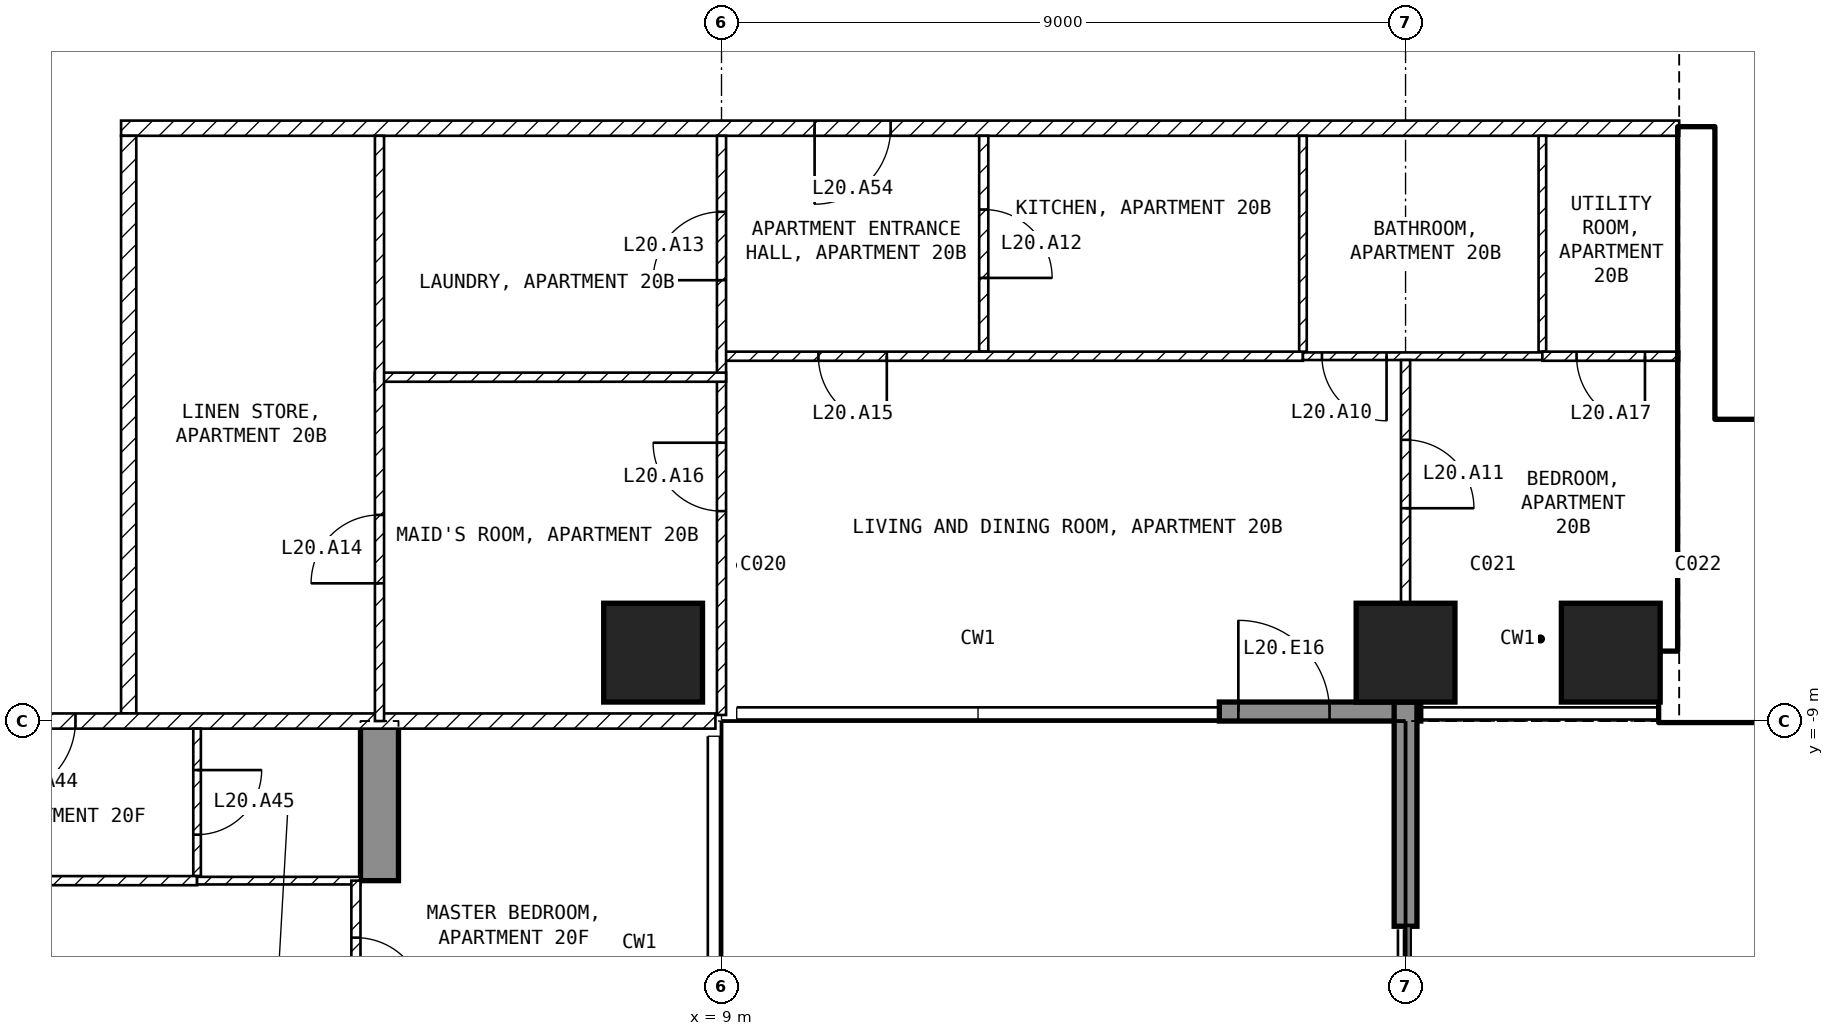
"""IFC4 building model, lengths in metres.
Left out: names, types, materials, properties, quantities, classifications, styles, units other than length and angle.
Written with IfcOpenShell. Run it as: python <this file> out.ifc"""

import sys

from ifc_helpers import new_model, si_unit, direction, frame, frame_2d, origin, origin_2d, place, context, subcontext, project, spatial, polyline, rectangle, outline, extrude, element, fill, save


model = new_model("IFC4")
c1 = context("Model", 3, precision=1e-05, world=origin(), true_north=direction((0.0, 1.0)))
c2 = subcontext(c1, "Body", "Model", "MODEL_VIEW")
j1 = project(units=[si_unit("LENGTHUNIT", "METRE"), si_unit("PLANEANGLEUNIT", "RADIAN")], contexts=[c1])
p1 = place(None, origin())
s1 = spatial("IfcSite", under=j1, at=p1, CompositionType="ELEMENT")
p2 = place(p1, origin())
s2 = spatial("IfcBuilding", under=s1, at=p2, CompositionType="ELEMENT")
p3 = place(p2, frame((0.0, 0.0, 89.0)))
s3 = spatial("IfcBuildingStorey", under=s2, at=p3, CompositionType="ELEMENT", Elevation=89.0)
for number, where, z_axis, x_axis in (
    (1, (8.1, -8.1, -0.25), (0.0, 0.0, 1.0), (1.0, 0.0, 0.0)),
    (2, (18.0, -8.1, -0.25), (0.0, 0.0, 1.0), (1.0, 0.0, 0.0)),
    (3, (20.7, -8.1, -0.25), (0.0, 0.0, 1.0), (1.0, 0.0, 0.0)),
):
    element("IfcColumn", number, at=place(p3, frame(where, z_axis=z_axis, x_axis=x_axis)), inside=s3, PredefinedType="COLUMN", context=c2, shape_type="SweptSolid", body=[
        extrude(rectangle(XDim=1.3, YDim=1.3, at=origin_2d()), origin(), (0.0, 0.0, 1.0), 3.45),
    ])
p4 = place(p3, frame((4.25, -25.45, -0.25), z_axis=(1.0, 0.0, 0.0), x_axis=(0.0, 1.0, 0.0)))
e4 = element("IfcWall", 4, at=p4, inside=s3, PredefinedType="SHEAR", context=c2, shape_type="SweptSolid", body=[
    extrude(outline(polyline([(0.0, 0.0), (4.15, 0.0), (4.15, 2.65), (6.55, 2.65), (6.55, 0.0), (11.95, 0.0), (11.95, 2.65), (14.35, 2.65), (14.35, 0.0), (16.45, 0.0), (16.45, 3.45), (0.0, 3.45), (0.0, 0.0)])), origin(), (0.0, 0.0, 1.0), 0.5),
])
p5 = place(p3, frame((15.55, -8.875, 0.0), z_axis=(0.0, 0.0, 1.0), x_axis=(1.0, 0.0, 0.0)))
e5 = element("IfcWall", 5, at=p5, inside=s3, PredefinedType="SOLIDWALL", context=c2, shape_type="SweptSolid", body=[
    extrude(rectangle(XDim=2.65, YDim=0.25, at=frame_2d((1.325, 0.0))), origin(), (0.0, 0.0, 1.0), 3.2),
])
p6 = place(p5, frame((0.25, 0.0, 0.0)))
e6 = element("IfcOpeningElement", 6, at=p6, cuts=e5, PredefinedType="OPENING", context=c2, shape_type="SweptSolid", body=[
    extrude(rectangle(XDim=1.2, YDim=2.4, at=frame_2d((0.6, 1.2))), frame((0.0, 0.135, 0.0), z_axis=(0.0, -1.0, 0.0), x_axis=(1.0, 0.0, 0.0)), (0.0, 0.0, 1.0), 0.27),
])
p7 = place(p3, frame((18.0, -8.75, 0.0), z_axis=(0.0, 0.0, 1.0), x_axis=(0.0, -1.0, 0.0)))
e7 = element("IfcWall", 7, at=p7, inside=s3, PredefinedType="SOLIDWALL", context=c2, shape_type="SweptSolid", body=[
    extrude(rectangle(XDim=2.95, YDim=0.3, at=frame_2d((1.475, 0.0))), origin(), (0.0, 0.0, 1.0), 3.2),
])
p8 = place(p3, frame((21.35, -8.55, 0.0), z_axis=(0.0, 0.0, 1.0), x_axis=(1.0, 0.0, 0.0)))
e8 = element("IfcWall", 8, at=p8, inside=s3, PredefinedType="SHEAR", context=c2, shape_type="SweptSolid", body=[
    extrude(rectangle(XDim=11.05, YDim=0.9, at=frame_2d((5.525, 0.0))), origin(), (0.0, 0.0, 1.0), 3.2),
])
p9 = place(p3, frame((21.825, -8.1, 0.0), z_axis=(0.0, 0.0, 1.0), x_axis=(0.0, 1.0, 0.0)))
e9 = element("IfcWall", 9, at=p9, inside=s3, PredefinedType="SHEAR", context=c2, shape_type="SweptSolid", body=[
    extrude(rectangle(XDim=6.9, YDim=0.45, at=frame_2d((3.45, 0.0))), origin(), (0.0, 0.0, 1.0), 3.2),
])
p10 = place(p3, frame((22.05, -5.15, 0.0), z_axis=(0.0, 0.0, 1.0), x_axis=(1.0, 0.0, 0.0)))
e10 = element("IfcWall", 10, at=p10, inside=s3, PredefinedType="SOLIDWALL", context=c2, shape_type="SweptSolid", body=[
    extrude(rectangle(XDim=6.3, YDim=0.2, at=frame_2d((3.15, 0.0))), origin(), (0.0, 0.0, 1.0), 3.2),
])
p11 = place(p10, frame((0.2, 0.0, 0.0)))
e11 = element("IfcOpeningElement", 11, at=p11, cuts=e10, PredefinedType="OPENING", context=c2, shape_type="SweptSolid", body=[
    extrude(rectangle(XDim=1.0, YDim=2.1, at=frame_2d((0.5, 1.05))), frame((0.0, 0.11, 0.0), z_axis=(0.0, -1.0, 0.0), x_axis=(1.0, 0.0, 0.0)), (0.0, 0.0, 1.0), 0.22),
])
p12 = place(p3, frame((21.6, -1.2, 0.0), z_axis=(0.0, 0.0, 1.0), x_axis=(-1.0, 0.0, 0.0)))
e12 = element("IfcWall", 12, at=p12, inside=s3, PredefinedType="PARTITIONING", context=c2, shape_type="SweptSolid", body=[
    extrude(rectangle(XDim=20.5, YDim=0.2, at=frame_2d((10.25, 0.0))), origin(), (0.0, 0.0, 1.0), 3.2),
])
p13 = place(p12, frame((10.375, 0.0, 0.0)))
e13 = element("IfcOpeningElement", 13, at=p13, cuts=e12, PredefinedType="OPENING", context=c2, shape_type="SweptSolid", body=[
    extrude(rectangle(XDim=1.0, YDim=2.1, at=frame_2d((0.5, 1.05))), frame((0.0, 0.11, 0.0), z_axis=(0.0, -1.0, 0.0), x_axis=(1.0, 0.0, 0.0)), (0.0, 0.0, 1.0), 0.22),
])
p14 = place(p3, frame((1.2, -1.3, 0.0), z_axis=(0.0, 0.0, 1.0), x_axis=(0.0, -1.0, 0.0)))
e14 = element("IfcWall", 14, at=p14, inside=s3, PredefinedType="PARTITIONING", context=c2, shape_type="SweptSolid", body=[
    extrude(rectangle(XDim=7.6, YDim=0.2, at=frame_2d((3.8, 0.0))), origin(), (0.0, 0.0, 1.0), 3.2),
])
p15 = place(p3, frame((8.92, -9.0, 0.0), z_axis=(0.0, 0.0, 1.0), x_axis=(-1.0, 0.0, 0.0)))
e15 = element("IfcWall", 15, at=p15, inside=s3, PredefinedType="PARTITIONING", context=c2, shape_type="SweptSolid", body=[
    extrude(rectangle(XDim=17.84, YDim=0.2, at=frame_2d((8.92, 0.0))), origin(), (0.0, 0.0, 1.0), 3.2),
])
p16 = place(p15, frame((8.42, 0.0, 0.0)))
e16 = element("IfcOpeningElement", 16, at=p16, cuts=e15, PredefinedType="OPENING", context=c2, shape_type="SweptSolid", body=[
    extrude(rectangle(XDim=1.0, YDim=2.1, at=frame_2d((0.5, 1.05))), frame((0.0, 0.11, 0.0), z_axis=(0.0, -1.0, 0.0), x_axis=(1.0, 0.0, 0.0)), (0.0, 0.0, 1.0), 0.22),
])
p17 = place(p3, frame((12.45, -1.3, 0.0), z_axis=(0.0, 0.0, 1.0), x_axis=(0.0, -1.0, 0.0)))
e17 = element("IfcWall", 17, at=p17, inside=s3, PredefinedType="PARTITIONING", context=c2, shape_type="SweptSolid", body=[
    extrude(rectangle(XDim=2.84, YDim=0.12, at=frame_2d((1.42, 0.0))), origin(), (0.0, 0.0, 1.0), 3.2),
])
p18 = place(p17, frame((0.97, 0.0, 0.0)))
e18 = element("IfcOpeningElement", 18, at=p18, cuts=e17, PredefinedType="OPENING", context=c2, shape_type="SweptSolid", body=[
    extrude(rectangle(XDim=0.9, YDim=2.1, at=frame_2d((0.45, 1.05))), frame((0.0, 0.07, 0.0), z_axis=(0.0, -1.0, 0.0), x_axis=(1.0, 0.0, 0.0)), (0.0, 0.0, 1.0), 0.14),
])
p19 = place(p3, frame((16.65, -4.2, 0.0), z_axis=(0.0, 0.0, 1.0), x_axis=(-1.0, 0.0, 0.0)))
e19 = element("IfcWall", 19, at=p19, inside=s3, PredefinedType="PARTITIONING", context=c2, shape_type="SweptSolid", body=[
    extrude(rectangle(XDim=7.71, YDim=0.12, at=frame_2d((3.855, 0.0))), origin(), (0.0, 0.0, 1.0), 3.2),
])
p20 = place(p19, frame((5.475, 0.0, 0.0)))
e20 = element("IfcOpeningElement", 20, at=p20, cuts=e19, PredefinedType="OPENING", context=c2, shape_type="SweptSolid", body=[
    extrude(rectangle(XDim=0.9, YDim=2.1, at=frame_2d((0.45, 1.05))), frame((0.0, 0.07, 0.0), z_axis=(0.0, -1.0, 0.0), x_axis=(1.0, 0.0, 0.0)), (0.0, 0.0, 1.0), 0.14),
])
p21 = place(p3, frame((9.0, -8.92, 0.0), z_axis=(0.0, 0.0, 1.0), x_axis=(0.0, 1.0, 0.0)))
e21 = element("IfcWall", 21, at=p21, inside=s3, PredefinedType="PARTITIONING", context=c2, shape_type="SweptSolid", body=[
    extrude(rectangle(XDim=7.62, YDim=0.12, at=frame_2d((3.81, 0.0))), origin(), (0.0, 0.0, 1.0), 3.2),
])
p22 = place(p21, frame((5.72, 0.0, 0.0)))
e22 = element("IfcOpeningElement", 22, at=p22, cuts=e21, PredefinedType="OPENING", context=c2, shape_type="SweptSolid", body=[
    extrude(rectangle(XDim=0.9, YDim=2.1, at=frame_2d((0.45, 1.05))), frame((0.0, 0.07, 0.0), z_axis=(0.0, -1.0, 0.0), x_axis=(1.0, 0.0, 0.0)), (0.0, 0.0, 1.0), 0.14),
])
p23 = place(p21, frame((2.682, 0.0, 0.0)))
e23 = element("IfcOpeningElement", 23, at=p23, cuts=e21, PredefinedType="OPENING", context=c2, shape_type="SweptSolid", body=[
    extrude(rectangle(XDim=0.9, YDim=2.1, at=frame_2d((0.45, 1.05))), frame((0.0, 0.07, 0.0), z_axis=(0.0, -1.0, 0.0), x_axis=(1.0, 0.0, 0.0)), (0.0, 0.0, 1.0), 0.14),
])
for number, where, z_axis, x_axis in (
    (24, (16.65, -1.3, 0.0), (0.0, 0.0, 1.0), (0.0, -1.0, 0.0)),
    (25, (19.8, -1.3, 0.0), (0.0, 0.0, 1.0), (0.0, -1.0, 0.0)),
):
    element("IfcWall", number, at=place(p3, frame(where, z_axis=z_axis, x_axis=x_axis)), inside=s3, PredefinedType="PARTITIONING", context=c2, shape_type="SweptSolid", body=[
        extrude(rectangle(XDim=2.84, YDim=0.1, at=frame_2d((1.42, 0.0))), origin(), (0.0, 0.0, 1.0), 3.2),
    ])
p24 = place(p3, frame((19.8, -4.2, 0.0), z_axis=(0.0, 0.0, 1.0), x_axis=(-1.0, 0.0, 0.0)))
e26 = element("IfcWall", 26, at=p24, inside=s3, PredefinedType="PARTITIONING", context=c2, shape_type="SweptSolid", body=[
    extrude(rectangle(XDim=3.15, YDim=0.1, at=frame_2d((1.575, 0.0))), origin(), (0.0, 0.0, 1.0), 3.2),
])
p25 = place(p24, frame((2.05, 0.0, 0.0)))
e27 = element("IfcOpeningElement", 27, at=p25, cuts=e26, PredefinedType="OPENING", context=c2, shape_type="SweptSolid", body=[
    extrude(rectangle(XDim=0.85, YDim=2.1, at=frame_2d((0.425, 1.05))), frame((0.0, 0.06, 0.0), z_axis=(0.0, -1.0, 0.0), x_axis=(1.0, 0.0, 0.0)), (0.0, 0.0, 1.0), 0.12),
])
p26 = place(p3, frame((21.6, -4.2, 0.0), z_axis=(0.0, 0.0, 1.0), x_axis=(-1.0, 0.0, 0.0)))
e28 = element("IfcWall", 28, at=p26, inside=s3, PredefinedType="PARTITIONING", context=c2, shape_type="SweptSolid", body=[
    extrude(rectangle(XDim=1.8, YDim=0.12, at=frame_2d((0.9, 0.0))), origin(), (0.0, 0.0, 1.0), 3.2),
])
p27 = place(p26, frame((0.45, 0.0, 0.0)))
e29 = element("IfcOpeningElement", 29, at=p27, cuts=e28, PredefinedType="OPENING", context=c2, shape_type="SweptSolid", body=[
    extrude(rectangle(XDim=0.9, YDim=2.1, at=frame_2d((0.45, 1.05))), frame((0.0, 0.07, 0.0), z_axis=(0.0, -1.0, 0.0), x_axis=(1.0, 0.0, 0.0)), (0.0, 0.0, 1.0), 0.14),
])
p28 = place(p3, frame((18.0, -4.25, 0.0), z_axis=(0.0, 0.0, 1.0), x_axis=(0.0, -1.0, 0.0)))
e30 = element("IfcWall", 30, at=p28, inside=s3, PredefinedType="PARTITIONING", context=c2, shape_type="SweptSolid", body=[
    extrude(rectangle(XDim=3.2, YDim=0.12, at=frame_2d((1.6, 0.0))), origin(), (0.0, 0.0, 1.0), 2.296),
])
p29 = place(p28, frame((1.05, 0.0, 0.0)))
e31 = element("IfcOpeningElement", 31, at=p29, cuts=e30, PredefinedType="OPENING", context=c2, shape_type="SweptSolid", body=[
    extrude(rectangle(XDim=0.9, YDim=2.1, at=frame_2d((0.45, 1.05))), frame((0.0, 0.07, 0.0), z_axis=(0.0, -1.0, 0.0), x_axis=(1.0, 0.0, 0.0)), (0.0, 0.0, 1.0), 0.14),
])
p30 = place(p3, frame((9.06, -4.476, 0.0), z_axis=(0.0, 0.0, 1.0), x_axis=(-1.0, 0.0, 0.0)))
e32 = element("IfcWall", 32, at=p30, inside=s3, PredefinedType="PARTITIONING", context=c2, shape_type="SweptSolid", body=[
    extrude(rectangle(XDim=4.62, YDim=0.12, at=frame_2d((2.31, 0.0))), origin(), (0.0, 0.0, 1.0), 3.2),
])
p31 = place(p3, frame((4.5, -9.0, 0.0), z_axis=(0.0, 0.0, 1.0), x_axis=(0.0, 1.0, 0.0)))
e33 = element("IfcWall", 33, at=p31, inside=s3, PredefinedType="PARTITIONING", context=c2, shape_type="SweptSolid", body=[
    extrude(rectangle(XDim=7.7, YDim=0.12, at=frame_2d((3.85, 0.0))), origin(), (0.0, 0.0, 1.0), 3.2),
])
p32 = place(p31, frame((1.812, 0.0, 0.0)))
e34 = element("IfcOpeningElement", 34, at=p32, cuts=e33, PredefinedType="OPENING", context=c2, shape_type="SweptSolid", body=[
    extrude(rectangle(XDim=0.9, YDim=2.1, at=frame_2d((0.45, 1.05))), frame((0.0, 0.07, 0.0), z_axis=(0.0, -1.0, 0.0), x_axis=(1.0, 0.0, 0.0)), (0.0, 0.0, 1.0), 0.14),
])
p33 = place(p3, frame((2.1, -9.1, 0.0), z_axis=(0.0, 0.0, 1.0), x_axis=(0.0, -1.0, 0.0)))
e35 = element("IfcWall", 35, at=p33, inside=s3, PredefinedType="PARTITIONING", context=c2, shape_type="SweptSolid", body=[
    extrude(rectangle(XDim=1.94, YDim=0.1, at=frame_2d((0.97, 0.0))), origin(), (0.0, 0.0, 1.0), 3.2),
])
p34 = place(p33, frame((0.545, 0.0, 0.0)))
e36 = element("IfcOpeningElement", 36, at=p34, cuts=e35, PredefinedType="OPENING", context=c2, shape_type="SweptSolid", body=[
    extrude(rectangle(XDim=0.85, YDim=2.1, at=frame_2d((0.425, 1.05))), frame((0.0, 0.06, 0.0), z_axis=(0.0, -1.0, 0.0), x_axis=(1.0, 0.0, 0.0)), (0.0, 0.0, 1.0), 0.12),
])
p35 = place(p3, frame((2.1, -11.1, 0.0), z_axis=(0.0, 0.0, 1.0), x_axis=(-1.0, 0.0, 0.0)))
e37 = element("IfcWall", 37, at=p35, inside=s3, PredefinedType="PARTITIONING", context=c2, shape_type="SweptSolid", body=[
    extrude(rectangle(XDim=6.35, YDim=0.12, at=frame_2d((3.175, 0.0))), origin(), (0.0, 0.0, 1.0), 3.2),
])
p36 = place(p35, frame((2.725, 0.0, 0.0)))
e38 = element("IfcOpeningElement", 38, at=p36, cuts=e37, PredefinedType="OPENING", context=c2, shape_type="SweptSolid", body=[
    extrude(rectangle(XDim=0.9, YDim=2.1, at=frame_2d((0.45, 1.05))), frame((0.0, 0.07, 0.0), z_axis=(0.0, -1.0, 0.0), x_axis=(1.0, 0.0, 0.0)), (0.0, 0.0, 1.0), 0.14),
])
p37 = place(p3, frame((4.25, -11.1, 0.0), z_axis=(0.0, 0.0, 1.0), x_axis=(-1.0, 0.0, 0.0)))
e39 = element("IfcWall", 39, at=p37, inside=s3, PredefinedType="PARTITIONING", context=c2, shape_type="SweptSolid", body=[
    extrude(rectangle(XDim=2.15, YDim=0.1, at=frame_2d((1.075, 0.0))), origin(), (0.0, 0.0, 1.0), 3.2),
])
p38 = place(p3, frame((4.19, -11.1, 0.0), z_axis=(0.0, 0.0, 1.0), x_axis=(0.0, -1.0, 0.0)))
e40 = element("IfcWall", 40, at=p38, inside=s3, PredefinedType="PARTITIONING", context=c2, shape_type="SweptSolid", body=[
    extrude(rectangle(XDim=2.4, YDim=0.12, at=frame_2d((1.2, 0.0))), origin(), (0.0, 0.0, 1.0), 2.4),
])
p39 = place(p38, frame((0.75, 0.0, 0.0)))
e41 = element("IfcOpeningElement", 41, at=p39, cuts=e40, PredefinedType="OPENING", context=c2, shape_type="SweptSolid", body=[
    extrude(rectangle(XDim=0.9, YDim=2.1, at=frame_2d((0.45, 1.05))), frame((0.0, 0.07, 0.0), z_axis=(0.0, -1.0, 0.0), x_axis=(1.0, 0.0, 0.0)), (0.0, 0.0, 1.0), 0.14),
])
p40 = place(p6, origin())
e42 = element("IfcDoor", 42, at=p40, inside=s3, OperationType="SINGLE_SWING_LEFT", PredefinedType="DOOR", context=c2, shape_type="SweptSolid", body=[
    extrude(rectangle(XDim=1.2, YDim=2.4, at=frame_2d((0.6, 1.2))), frame((0.0, 0.025, 0.0), z_axis=(0.0, -1.0, 0.0), x_axis=(1.0, 0.0, 0.0)), (0.0, 0.0, 1.0), 0.05),
])
fill(e6, e42)
p41 = place(p11, origin())
e43 = element("IfcDoor", 43, at=p41, inside=s3, OperationType="SINGLE_SWING_LEFT", PredefinedType="DOOR", context=c2, shape_type="SweptSolid", body=[
    extrude(rectangle(XDim=1.0, YDim=2.1, at=frame_2d((0.5, 1.05))), frame((0.0, 0.025, 0.0), z_axis=(0.0, -1.0, 0.0), x_axis=(1.0, 0.0, 0.0)), (0.0, 0.0, 1.0), 0.05),
])
fill(e11, e43)
p42 = place(p25, origin())
e44 = element("IfcDoor", 44, at=p42, inside=s3, OperationType="SINGLE_SWING_LEFT", PredefinedType="DOOR", context=c2, shape_type="SweptSolid", body=[
    extrude(rectangle(XDim=0.85, YDim=2.1, at=frame_2d((0.425, 1.05))), frame((0.0, 0.025, 0.0), z_axis=(0.0, -1.0, 0.0), x_axis=(1.0, 0.0, 0.0)), (0.0, 0.0, 1.0), 0.05),
])
fill(e27, e44)
p43 = place(p29, origin())
e45 = element("IfcDoor", 45, at=p43, inside=s3, OperationType="SINGLE_SWING_RIGHT", PredefinedType="DOOR", context=c2, shape_type="SweptSolid", body=[
    extrude(rectangle(XDim=0.9, YDim=2.1, at=frame_2d((0.45, 1.05))), frame((0.0, 0.025, 0.0), z_axis=(0.0, -1.0, 0.0), x_axis=(1.0, 0.0, 0.0)), (0.0, 0.0, 1.0), 0.05),
])
fill(e31, e45)
p44 = place(p18, origin())
e46 = element("IfcDoor", 46, at=p44, inside=s3, OperationType="SINGLE_SWING_RIGHT", PredefinedType="DOOR", context=c2, shape_type="SweptSolid", body=[
    extrude(rectangle(XDim=0.9, YDim=2.1, at=frame_2d((0.45, 1.05))), frame((0.0, 0.025, 0.0), z_axis=(0.0, -1.0, 0.0), x_axis=(1.0, 0.0, 0.0)), (0.0, 0.0, 1.0), 0.05),
])
fill(e18, e46)
p45 = place(p22, origin())
e47 = element("IfcDoor", 47, at=p45, inside=s3, OperationType="SINGLE_SWING_LEFT", PredefinedType="DOOR", context=c2, shape_type="SweptSolid", body=[
    extrude(rectangle(XDim=0.9, YDim=2.1, at=frame_2d((0.45, 1.05))), frame((0.0, 0.025, 0.0), z_axis=(0.0, -1.0, 0.0), x_axis=(1.0, 0.0, 0.0)), (0.0, 0.0, 1.0), 0.05),
])
fill(e22, e47)
p46 = place(p32, origin())
e48 = element("IfcDoor", 48, at=p46, inside=s3, OperationType="SINGLE_SWING_LEFT", PredefinedType="DOOR", context=c2, shape_type="SweptSolid", body=[
    extrude(rectangle(XDim=0.9, YDim=2.1, at=frame_2d((0.45, 1.05))), frame((0.0, 0.025, 0.0), z_axis=(0.0, -1.0, 0.0), x_axis=(1.0, 0.0, 0.0)), (0.0, 0.0, 1.0), 0.05),
])
fill(e34, e48)
p47 = place(p20, origin())
e49 = element("IfcDoor", 49, at=p47, inside=s3, OperationType="SINGLE_SWING_LEFT", PredefinedType="DOOR", context=c2, shape_type="SweptSolid", body=[
    extrude(rectangle(XDim=0.9, YDim=2.1, at=frame_2d((0.45, 1.05))), frame((0.0, 0.025, 0.0), z_axis=(0.0, -1.0, 0.0), x_axis=(1.0, 0.0, 0.0)), (0.0, 0.0, 1.0), 0.05),
])
fill(e20, e49)
p48 = place(p23, origin())
e50 = element("IfcDoor", 50, at=p48, inside=s3, OperationType="SINGLE_SWING_RIGHT", PredefinedType="DOOR", context=c2, shape_type="SweptSolid", body=[
    extrude(rectangle(XDim=0.9, YDim=2.1, at=frame_2d((0.45, 1.05))), frame((0.0, 0.025, 0.0), z_axis=(0.0, -1.0, 0.0), x_axis=(1.0, 0.0, 0.0)), (0.0, 0.0, 1.0), 0.05),
])
fill(e23, e50)
p49 = place(p27, origin())
e51 = element("IfcDoor", 51, at=p49, inside=s3, OperationType="SINGLE_SWING_LEFT", PredefinedType="DOOR", context=c2, shape_type="SweptSolid", body=[
    extrude(rectangle(XDim=0.9, YDim=2.1, at=frame_2d((0.45, 1.05))), frame((0.0, 0.025, 0.0), z_axis=(0.0, -1.0, 0.0), x_axis=(1.0, 0.0, 0.0)), (0.0, 0.0, 1.0), 0.05),
])
fill(e29, e51)
p50 = place(p16, origin())
e52 = element("IfcDoor", 52, at=p50, inside=s3, OperationType="SINGLE_SWING_RIGHT", PredefinedType="DOOR", context=c2, shape_type="SweptSolid", body=[
    extrude(rectangle(XDim=1.0, YDim=2.1, at=frame_2d((0.5, 1.05))), frame((0.0, 0.025, 0.0), z_axis=(0.0, -1.0, 0.0), x_axis=(1.0, 0.0, 0.0)), (0.0, 0.0, 1.0), 0.05),
])
fill(e16, e52)
p51 = place(p34, origin())
e53 = element("IfcDoor", 53, at=p51, inside=s3, OperationType="SINGLE_SWING_LEFT", PredefinedType="DOOR", context=c2, shape_type="SweptSolid", body=[
    extrude(rectangle(XDim=0.85, YDim=2.1, at=frame_2d((0.425, 1.05))), frame((0.0, 0.025, 0.0), z_axis=(0.0, -1.0, 0.0), x_axis=(1.0, 0.0, 0.0)), (0.0, 0.0, 1.0), 0.05),
])
fill(e36, e53)
p52 = place(p13, origin())
e54 = element("IfcDoor", 54, at=p52, inside=s3, OperationType="SINGLE_SWING_RIGHT", PredefinedType="DOOR", context=c2, shape_type="SweptSolid", body=[
    extrude(rectangle(XDim=1.0, YDim=2.1, at=frame_2d((0.5, 1.05))), frame((0.0, 0.025, 0.0), z_axis=(0.0, -1.0, 0.0), x_axis=(1.0, 0.0, 0.0)), (0.0, 0.0, 1.0), 0.05),
])
fill(e13, e54)
p53 = place(p39, origin())
e55 = element("IfcDoor", 55, at=p53, inside=s3, OperationType="SINGLE_SWING_RIGHT", PredefinedType="DOOR", context=c2, shape_type="SweptSolid", body=[
    extrude(rectangle(XDim=0.9, YDim=2.1, at=frame_2d((0.45, 1.05))), frame((0.0, 0.025, 0.0), z_axis=(0.0, -1.0, 0.0), x_axis=(1.0, 0.0, 0.0)), (0.0, 0.0, 1.0), 0.05),
])
fill(e41, e55)
save(model, sys.argv[1])
